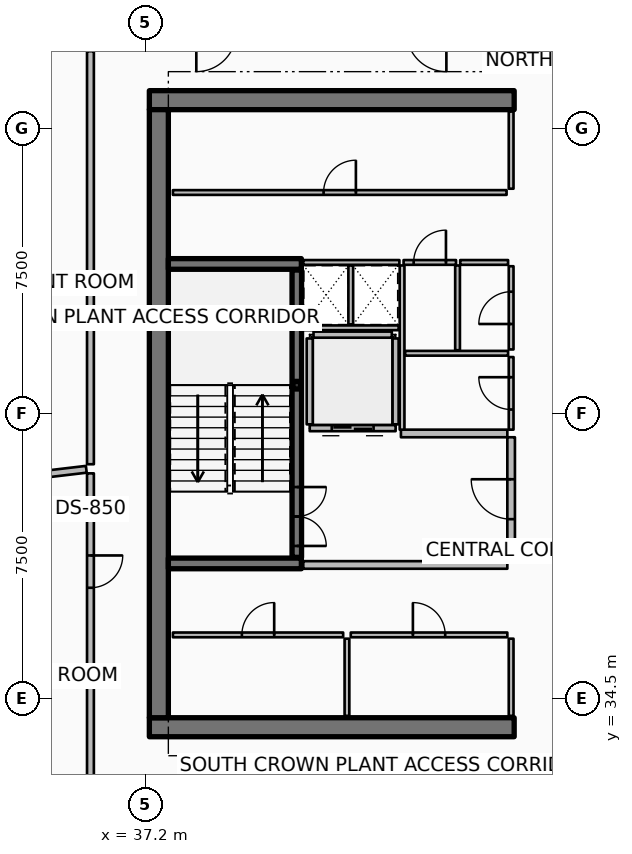
"""IFC4 building model, lengths in metres.
Left out: names, types, materials, properties, quantities, classifications, styles, units other than length and angle.
Written with IfcOpenShell. Run it as: python <this file> out.ifc"""

import sys

from ifc_helpers import new_model, si_unit, direction, frame, frame_2d, origin, origin_2d, place, context, subcontext, project, spatial, rectangle, hollow_rectangle, extrude, element, fill, save


model = new_model("IFC4")
c1 = context("Model", 3, precision=1e-05, world=origin(), true_north=direction((0.0, 1.0)))
c2 = subcontext(c1, "Body", "Model", "MODEL_VIEW")
j1 = project(units=[si_unit("LENGTHUNIT", "METRE"), si_unit("PLANEANGLEUNIT", "RADIAN")], contexts=[c1])
p1 = place(None, origin())
s1 = spatial("IfcSite", under=j1, at=p1, CompositionType="ELEMENT")
p2 = place(p1, origin())
s2 = spatial("IfcBuilding", under=s1, at=p2, CompositionType="ELEMENT")
p3 = place(p2, frame((0.0, 0.0, 370.4)))
s3 = spatial("IfcBuildingStorey", under=s2, at=p3, CompositionType="ELEMENT", Elevation=370.4)
for number, where, z_axis, x_axis in (
    (1, (37.3, 33.75, 0.0), (0.0, 0.0, 1.0), (1.0, 0.0, 0.0)),
    (2, (37.3, 50.25, 0.0), (0.0, 0.0, 1.0), (1.0, 0.0, 0.0)),
):
    element("IfcWall", number, at=place(p3, frame(where, z_axis=z_axis, x_axis=x_axis)), inside=s3, PredefinedType="SHEAR", context=c2, shape_type="SweptSolid", body=[
        extrude(rectangle(XDim=9.6, YDim=0.5, at=frame_2d((4.8, 0.0))), origin(), (0.0, 0.0, 1.0), 3.6),
    ])
p4 = place(p3, frame((37.55, 34.0, 0.0), z_axis=(0.0, 0.0, 1.0), x_axis=(0.0, 1.0, 0.0)))
e3 = element("IfcWall", 3, at=p4, inside=s3, PredefinedType="SHEAR", context=c2, shape_type="SweptSolid", body=[
    extrude(rectangle(XDim=16.0, YDim=0.5, at=frame_2d((8.0, 0.0))), origin(), (0.0, 0.0, 1.0), 3.6),
])
for number, where, z_axis, x_axis in (
    (4, (37.8, 38.06, 0.0), (0.0, 0.0, 1.0), (1.0, 0.0, 0.0)),
    (5, (37.8, 45.94, 0.0), (0.0, 0.0, 1.0), (1.0, 0.0, 0.0)),
):
    element("IfcWall", number, at=place(p3, frame(where, z_axis=z_axis, x_axis=x_axis)), inside=s3, PredefinedType="SHEAR", context=c2, shape_type="SweptSolid", body=[
        extrude(rectangle(XDim=3.5, YDim=0.28, at=frame_2d((1.75, 0.0))), origin(), (0.0, 0.0, 1.0), 3.6),
    ])
p5 = place(p3, frame((41.18, 42.75, 0.0), z_axis=(0.0, 0.0, 1.0), x_axis=(1.0, 0.0, 0.0)))
e6 = element("IfcColumn", 6, at=p5, inside=s3, PredefinedType="COLUMN", context=c2, shape_type="SweptSolid", body=[
    extrude(hollow_rectangle(XDim=0.2, YDim=0.2, WallThickness=0.01, InnerFilletRadius=0.01, OuterFilletRadius=0.02, at=origin_2d()), origin(), (0.0, 0.0, 1.0), 1.595),
])
p6 = place(p3, frame((41.18, 38.22, 0.0), z_axis=(0.0, 0.0, 1.0), x_axis=(0.0, 1.0, 0.0)))
e7 = element("IfcWall", 7, at=p6, inside=s3, PredefinedType="SOLIDWALL", context=c2, shape_type="SweptSolid", body=[
    extrude(rectangle(XDim=7.56, YDim=0.25, at=frame_2d((3.78, 0.0))), origin(), (0.0, 0.0, 1.0), 3.32),
])
p7 = place(p6, frame((0.3, 0.0, 0.0)))
e8 = element("IfcOpeningElement", 8, at=p7, cuts=e7, PredefinedType="OPENING", context=c2, shape_type="SweptSolid", body=[
    extrude(rectangle(XDim=1.55, YDim=2.15, at=frame_2d((0.775, 1.075))), frame((0.0, 0.135, 0.0), z_axis=(0.0, -1.0, 0.0), x_axis=(1.0, 0.0, 0.0)), (0.0, 0.0, 1.0), 0.27),
])
p8 = place(p3, frame((43.78, 41.62, 0.0), z_axis=(0.0, 0.0, 1.0), x_axis=(-1.0, 0.0, 0.0)))
e9 = element("IfcWall", 9, at=p8, inside=s3, PredefinedType="PARTITIONING", context=c2, shape_type="SweptSolid", body=[
    extrude(rectangle(XDim=2.26, YDim=0.16, at=frame_2d((1.13, 0.0))), origin(), (0.0, 0.0, 1.0), 3.32),
])
p9 = place(p8, frame((0.58, 0.0, 0.0)))
e10 = element("IfcOpeningElement", 10, at=p9, cuts=e9, PredefinedType="OPENING", context=c2, shape_type="SweptSolid", body=[
    extrude(rectangle(XDim=1.1, YDim=2.1, at=frame_2d((0.55, 1.05))), frame((0.0, 0.09, 0.0), z_axis=(0.0, -1.0, 0.0), x_axis=(1.0, 0.0, 0.0)), (0.0, 0.0, 1.0), 0.18),
])
for number, where, z_axis, x_axis in (
    (11, (43.78, 41.72, 0.0), (0.0, 0.0, 1.0), (0.0, 1.0, 0.0)),
    (12, (41.52, 41.72, 0.0), (0.0, 0.0, 1.0), (0.0, 1.0, 0.0)),
):
    element("IfcWall", number, at=place(p3, frame(where, z_axis=z_axis, x_axis=x_axis)), inside=s3, PredefinedType="PARTITIONING", context=c2, shape_type="SweptSolid", body=[
        extrude(rectangle(XDim=2.26, YDim=0.16, at=frame_2d((1.13, 0.0))), origin(), (0.0, 0.0, 1.0), 3.32),
    ])
p10 = place(p3, frame((41.62, 44.08, 0.0), z_axis=(0.0, 0.0, 1.0), x_axis=(1.0, 0.0, 0.0)))
e13 = element("IfcWall", 13, at=p10, inside=s3, PredefinedType="PARTITIONING", context=c2, shape_type="SweptSolid", body=[
    extrude(rectangle(XDim=2.06, YDim=0.16, at=frame_2d((1.03, 0.0))), origin(), (0.0, 0.0, 1.0), 3.32),
])
for number, where, z_axis, x_axis in (
    (14, (46.82, 34.05, 0.0), (0.0, 0.0, 1.0), (0.0, 1.0, 0.0)),
    (15, (42.5, 34.05, 0.0), (0.0, 0.0, 1.0), (0.0, 1.0, 0.0)),
):
    element("IfcWall", number, at=place(p3, frame(where, z_axis=z_axis, x_axis=x_axis)), inside=s3, PredefinedType="PARTITIONING", context=c2, shape_type="SweptSolid", body=[
        extrude(rectangle(XDim=2.03, YDim=0.125, at=frame_2d((1.015, 0.0))), origin(), (0.0, 0.0, 1.0), 2.76),
    ])
p11 = place(p3, frame((37.92, 36.18, 0.0), z_axis=(0.0, 0.0, 1.0), x_axis=(1.0, 0.0, 0.0)))
e16 = element("IfcWall", 16, at=p11, inside=s3, PredefinedType="PARTITIONING", context=c2, shape_type="SweptSolid", body=[
    extrude(rectangle(XDim=4.48, YDim=0.125, at=frame_2d((2.24, 0.0))), origin(), (0.0, 0.0, 1.0), 2.76),
])
p12 = place(p11, frame((1.815, 0.0, 0.0)))
e17 = element("IfcOpeningElement", 17, at=p12, cuts=e16, PredefinedType="OPENING", context=c2, shape_type="SweptSolid", body=[
    extrude(rectangle(XDim=0.85, YDim=2.06, at=frame_2d((0.425, 1.03))), frame((0.0, 0.073, 0.0), z_axis=(0.0, -1.0, 0.0), x_axis=(1.0, 0.0, 0.0)), (0.0, 0.0, 1.0), 0.145),
])
p13 = place(p3, frame((42.6, 36.18, 0.0), z_axis=(0.0, 0.0, 1.0), x_axis=(1.0, 0.0, 0.0)))
e18 = element("IfcWall", 18, at=p13, inside=s3, PredefinedType="PARTITIONING", context=c2, shape_type="SweptSolid", body=[
    extrude(rectangle(XDim=4.12, YDim=0.125, at=frame_2d((2.06, 0.0))), origin(), (0.0, 0.0, 1.0), 2.76),
])
p14 = place(p13, frame((1.635, 0.0, 0.0)))
e19 = element("IfcOpeningElement", 19, at=p14, cuts=e18, PredefinedType="OPENING", context=c2, shape_type="SweptSolid", body=[
    extrude(rectangle(XDim=0.85, YDim=2.06, at=frame_2d((0.425, 1.03))), frame((0.0, 0.073, 0.0), z_axis=(0.0, -1.0, 0.0), x_axis=(1.0, 0.0, 0.0)), (0.0, 0.0, 1.0), 0.145),
])
p15 = place(p3, frame((46.82, 47.92, 0.0), z_axis=(0.0, 0.0, 1.0), x_axis=(0.0, 1.0, 0.0)))
e20 = element("IfcWall", 20, at=p15, inside=s3, PredefinedType="PARTITIONING", context=c2, shape_type="SweptSolid", body=[
    extrude(rectangle(XDim=2.03, YDim=0.125, at=frame_2d((1.015, 0.0))), origin(), (0.0, 0.0, 1.0), 2.76),
])
p16 = place(p3, frame((37.92, 47.82, 0.0), z_axis=(0.0, 0.0, 1.0), x_axis=(1.0, 0.0, 0.0)))
e21 = element("IfcWall", 21, at=p16, inside=s3, PredefinedType="PARTITIONING", context=c2, shape_type="SweptSolid", body=[
    extrude(rectangle(XDim=8.78, YDim=0.125, at=frame_2d((4.39, 0.0))), origin(), (0.0, 0.0, 1.0), 2.76),
])
p17 = place(p16, frame((3.965, 0.0, 0.0)))
e22 = element("IfcOpeningElement", 22, at=p17, cuts=e21, PredefinedType="OPENING", context=c2, shape_type="SweptSolid", body=[
    extrude(rectangle(XDim=0.85, YDim=2.06, at=frame_2d((0.425, 1.03))), frame((0.0, 0.073, 0.0), z_axis=(0.0, -1.0, 0.0), x_axis=(1.0, 0.0, 0.0)), (0.0, 0.0, 1.0), 0.145),
])
p18 = place(p3, frame((41.35, 38.02, 0.0), z_axis=(0.0, 0.0, 1.0), x_axis=(1.0, 0.0, 0.0)))
e23 = element("IfcWall", 23, at=p18, inside=s3, PredefinedType="PARTITIONING", context=c2, shape_type="SweptSolid", body=[
    extrude(rectangle(XDim=5.37, YDim=0.2, at=frame_2d((2.685, 0.0))), origin(), (0.0, 0.0, 1.0), 3.32),
])
p19 = place(p3, frame((43.92, 41.48, 0.0), z_axis=(0.0, 0.0, 1.0), x_axis=(1.0, 0.0, 0.0)))
e24 = element("IfcWall", 24, at=p19, inside=s3, PredefinedType="PARTITIONING", context=c2, shape_type="SweptSolid", body=[
    extrude(rectangle(XDim=2.8, YDim=0.2, at=frame_2d((1.4, 0.0))), origin(), (0.0, 0.0, 1.0), 3.32),
])
p20 = place(p3, frame((46.82, 38.12, 0.0), z_axis=(0.0, 0.0, 1.0), x_axis=(0.0, 1.0, 0.0)))
e25 = element("IfcWall", 25, at=p20, inside=s3, PredefinedType="PARTITIONING", context=c2, shape_type="SweptSolid", body=[
    extrude(rectangle(XDim=3.26, YDim=0.2, at=frame_2d((1.63, 0.0))), origin(), (0.0, 0.0, 1.0), 3.32),
])
p21 = place(p20, frame((1.105, 0.0, 0.0)))
e26 = element("IfcOpeningElement", 26, at=p21, cuts=e25, PredefinedType="OPENING", context=c2, shape_type="SweptSolid", body=[
    extrude(rectangle(XDim=1.05, YDim=2.1, at=frame_2d((0.525, 1.05))), frame((0.0, 0.11, 0.0), z_axis=(0.0, -1.0, 0.0), x_axis=(1.0, 0.0, 0.0)), (0.0, 0.0, 1.0), 0.22),
])
p22 = place(p3, frame((41.36, 44.26, 0.0), z_axis=(0.0, 0.0, 1.0), x_axis=(1.0, 0.0, 0.0)))
e27 = element("IfcWall", 27, at=p22, inside=s3, PredefinedType="PARTITIONING", context=c2, shape_type="SweptSolid", body=[
    extrude(rectangle(XDim=2.5, YDim=0.125, at=frame_2d((1.25, 0.0))), origin(), (0.0, 0.0, 1.0), 2.76),
])
p23 = place(p3, frame((42.6, 44.35, 0.0), z_axis=(0.0, 0.0, 1.0), x_axis=(0.0, 1.0, 0.0)))
e28 = element("IfcWall", 28, at=p23, inside=s3, PredefinedType="PARTITIONING", context=c2, shape_type="SweptSolid", body=[
    extrude(rectangle(XDim=1.55, YDim=0.125, at=frame_2d((0.775, 0.0))), origin(), (0.0, 0.0, 1.0), 2.76),
])
p24 = place(p3, frame((43.95, 41.58, 0.0), z_axis=(0.0, 0.0, 1.0), x_axis=(0.0, 1.0, 0.0)))
e29 = element("IfcWall", 29, at=p24, inside=s3, PredefinedType="PARTITIONING", context=c2, shape_type="SweptSolid", body=[
    extrude(rectangle(XDim=4.32, YDim=0.125, at=frame_2d((2.16, 0.0))), origin(), (0.0, 0.0, 1.0), 2.76),
])
p25 = place(p3, frame((44.03, 43.59, 0.0), z_axis=(0.0, 0.0, 1.0), x_axis=(1.0, 0.0, 0.0)))
e30 = element("IfcWall", 30, at=p25, inside=s3, PredefinedType="PARTITIONING", context=c2, shape_type="SweptSolid", body=[
    extrude(rectangle(XDim=2.71, YDim=0.125, at=frame_2d((1.355, 0.0))), origin(), (0.0, 0.0, 1.0), 2.76),
])
p26 = place(p3, frame((45.41, 43.67, 0.0), z_axis=(0.0, 0.0, 1.0), x_axis=(0.0, 1.0, 0.0)))
e31 = element("IfcWall", 31, at=p26, inside=s3, PredefinedType="PARTITIONING", context=c2, shape_type="SweptSolid", body=[
    extrude(rectangle(XDim=2.23, YDim=0.125, at=frame_2d((1.115, 0.0))), origin(), (0.0, 0.0, 1.0), 2.76),
])
p27 = place(p3, frame((46.82, 41.58, 0.0), z_axis=(0.0, 0.0, 1.0), x_axis=(0.0, 1.0, 0.0)))
e32 = element("IfcWall", 32, at=p27, inside=s3, PredefinedType="PARTITIONING", context=c2, shape_type="SweptSolid", body=[
    extrude(rectangle(XDim=1.91, YDim=0.125, at=frame_2d((0.955, 0.0))), origin(), (0.0, 0.0, 1.0), 2.76),
])
p28 = place(p27, frame((0.53, 0.0, 0.0)))
e33 = element("IfcOpeningElement", 33, at=p28, cuts=e32, PredefinedType="OPENING", context=c2, shape_type="SweptSolid", body=[
    extrude(rectangle(XDim=0.85, YDim=2.06, at=frame_2d((0.425, 1.03))), frame((0.0, 0.073, 0.0), z_axis=(0.0, -1.0, 0.0), x_axis=(1.0, 0.0, 0.0)), (0.0, 0.0, 1.0), 0.145),
])
p29 = place(p3, frame((46.82, 43.69, 0.0), z_axis=(0.0, 0.0, 1.0), x_axis=(0.0, 1.0, 0.0)))
e34 = element("IfcWall", 34, at=p29, inside=s3, PredefinedType="PARTITIONING", context=c2, shape_type="SweptSolid", body=[
    extrude(rectangle(XDim=2.19, YDim=0.125, at=frame_2d((1.095, 0.0))), origin(), (0.0, 0.0, 1.0), 2.76),
])
p30 = place(p29, frame((0.67, 0.0, 0.0)))
e35 = element("IfcOpeningElement", 35, at=p30, cuts=e34, PredefinedType="OPENING", context=c2, shape_type="SweptSolid", body=[
    extrude(rectangle(XDim=0.85, YDim=2.06, at=frame_2d((0.425, 1.03))), frame((0.0, 0.073, 0.0), z_axis=(0.0, -1.0, 0.0), x_axis=(1.0, 0.0, 0.0)), (0.0, 0.0, 1.0), 0.145),
])
p31 = place(p3, frame((41.35, 45.98, 0.0), z_axis=(0.0, 0.0, 1.0), x_axis=(1.0, 0.0, 0.0)))
e36 = element("IfcWall", 36, at=p31, inside=s3, PredefinedType="PARTITIONING", context=c2, shape_type="SweptSolid", body=[
    extrude(rectangle(XDim=2.53, YDim=0.125, at=frame_2d((1.265, 0.0))), origin(), (0.0, 0.0, 1.0), 2.76),
])
p32 = place(p3, frame((43.99, 45.98, 0.0), z_axis=(0.0, 0.0, 1.0), x_axis=(1.0, 0.0, 0.0)))
e37 = element("IfcWall", 37, at=p32, inside=s3, PredefinedType="PARTITIONING", context=c2, shape_type="SweptSolid", body=[
    extrude(rectangle(XDim=1.38, YDim=0.125, at=frame_2d((0.69, 0.0))), origin(), (0.0, 0.0, 1.0), 2.76),
])
p33 = place(p32, frame((0.265, 0.0, 0.0)))
e38 = element("IfcOpeningElement", 38, at=p33, cuts=e37, PredefinedType="OPENING", context=c2, shape_type="SweptSolid", body=[
    extrude(rectangle(XDim=0.85, YDim=2.06, at=frame_2d((0.425, 1.03))), frame((0.0, 0.073, 0.0), z_axis=(0.0, -1.0, 0.0), x_axis=(1.0, 0.0, 0.0)), (0.0, 0.0, 1.0), 0.145),
])
p34 = place(p3, frame((45.48, 45.98, 0.0), z_axis=(0.0, 0.0, 1.0), x_axis=(1.0, 0.0, 0.0)))
e39 = element("IfcWall", 39, at=p34, inside=s3, PredefinedType="PARTITIONING", context=c2, shape_type="SweptSolid", body=[
    extrude(rectangle(XDim=1.26, YDim=0.125, at=frame_2d((0.63, 0.0))), origin(), (0.0, 0.0, 1.0), 2.76),
])
p35 = place(p3, frame((35.75, 51.537, 0.0), z_axis=(0.0, 0.0, 1.0), x_axis=(0.0, -1.0, 0.0)))
e40 = element("IfcWall", 40, at=p35, inside=s3, PredefinedType="PARTITIONING", context=c2, shape_type="SweptSolid", body=[
    extrude(rectangle(XDim=5.962, YDim=0.18, at=frame_2d((2.981, 0.0))), origin(), (0.0, 0.0, 1.0), 2.76),
])
p36 = place(p3, frame((35.75, 45.335, 0.0), z_axis=(0.0, 0.0, 1.0), x_axis=(0.0, -1.0, 0.0)))
e41 = element("IfcWall", 41, at=p36, inside=s3, PredefinedType="PARTITIONING", context=c2, shape_type="SweptSolid", body=[
    extrude(rectangle(XDim=4.665, YDim=0.18, at=frame_2d((2.333, 0.0))), origin(), (0.0, 0.0, 1.0), 2.76),
])
p37 = place(p3, frame((35.641, 40.537, 0.0), z_axis=(0.0, 0.0, 1.0), x_axis=(-0.993070751419, -0.117518010011, 0.0)))
e42 = element("IfcWall", 42, at=p37, inside=s3, PredefinedType="PARTITIONING", context=c2, shape_type="SweptSolid", body=[
    extrude(rectangle(XDim=8.686, YDim=0.18, at=frame_2d((4.343, 0.0))), origin(), (0.0, 0.0, 1.0), 2.76),
])
p38 = place(p3, frame((35.75, 40.43, 0.0), z_axis=(0.0, 0.0, 1.0), x_axis=(0.0, -1.0, 0.0)))
e43 = element("IfcWall", 43, at=p38, inside=s3, PredefinedType="PARTITIONING", context=c2, shape_type="SweptSolid", body=[
    extrude(rectangle(XDim=5.17, YDim=0.18, at=frame_2d((2.585, 0.0))), origin(), (0.0, 0.0, 1.0), 2.76),
])
p39 = place(p38, frame((2.16, 0.0, 0.0)))
e44 = element("IfcOpeningElement", 44, at=p39, cuts=e43, PredefinedType="OPENING", context=c2, shape_type="SweptSolid", body=[
    extrude(rectangle(XDim=0.85, YDim=2.06, at=frame_2d((0.425, 1.03))), frame((0.0, 0.1, 0.0), z_axis=(0.0, -1.0, 0.0), x_axis=(1.0, 0.0, 0.0)), (0.0, 0.0, 1.0), 0.2),
])
p40 = place(p3, frame((35.75, 35.02, 0.0), z_axis=(0.0, 0.0, 1.0), x_axis=(0.0, -1.0, 0.0)))
e45 = element("IfcWall", 45, at=p40, inside=s3, PredefinedType="PARTITIONING", context=c2, shape_type="SweptSolid", body=[
    extrude(rectangle(XDim=2.95, YDim=0.18, at=frame_2d((1.475, 0.0))), origin(), (0.0, 0.0, 1.0), 2.76),
])
p41 = place(p7, origin())
e46 = element("IfcDoor", 46, at=p41, inside=s3, OperationType="DOUBLE_DOOR_SINGLE_SWING", PredefinedType="DOOR", context=c2, shape_type="SweptSolid", body=[
    extrude(rectangle(XDim=1.55, YDim=2.15, at=frame_2d((0.775, 1.075))), frame((0.0, 0.025, 0.0), z_axis=(0.0, -1.0, 0.0), x_axis=(1.0, 0.0, 0.0)), (0.0, 0.0, 1.0), 0.05),
])
fill(e8, e46)
p42 = place(p9, origin())
e47 = element("IfcDoor", 47, at=p42, inside=s3, OperationType="DOUBLE_DOOR_SLIDING", PredefinedType="DOOR", context=c2, shape_type="SweptSolid", body=[
    extrude(rectangle(XDim=1.1, YDim=2.1, at=frame_2d((0.55, 1.05))), frame((0.0, 0.025, 0.0), z_axis=(0.0, -1.0, 0.0), x_axis=(1.0, 0.0, 0.0)), (0.0, 0.0, 1.0), 0.05),
])
fill(e10, e47)
p43 = place(p12, origin())
e48 = element("IfcDoor", 48, at=p43, inside=s3, OperationType="SINGLE_SWING_RIGHT", PredefinedType="DOOR", context=c2, shape_type="SweptSolid", body=[
    extrude(rectangle(XDim=0.85, YDim=2.06, at=frame_2d((0.425, 1.03))), frame((0.0, 0.025, 0.0), z_axis=(0.0, -1.0, 0.0), x_axis=(1.0, 0.0, 0.0)), (0.0, 0.0, 1.0), 0.05),
])
fill(e17, e48)
p44 = place(p14, origin())
e49 = element("IfcDoor", 49, at=p44, inside=s3, OperationType="SINGLE_SWING_LEFT", PredefinedType="DOOR", context=c2, shape_type="SweptSolid", body=[
    extrude(rectangle(XDim=0.85, YDim=2.06, at=frame_2d((0.425, 1.03))), frame((0.0, 0.025, 0.0), z_axis=(0.0, -1.0, 0.0), x_axis=(1.0, 0.0, 0.0)), (0.0, 0.0, 1.0), 0.05),
])
fill(e19, e49)
p45 = place(p17, origin())
e50 = element("IfcDoor", 50, at=p45, inside=s3, OperationType="SINGLE_SWING_RIGHT", PredefinedType="DOOR", context=c2, shape_type="SweptSolid", body=[
    extrude(rectangle(XDim=0.85, YDim=2.06, at=frame_2d((0.425, 1.03))), frame((0.0, 0.025, 0.0), z_axis=(0.0, -1.0, 0.0), x_axis=(1.0, 0.0, 0.0)), (0.0, 0.0, 1.0), 0.05),
])
fill(e22, e50)
p46 = place(p21, origin())
e51 = element("IfcDoor", 51, at=p46, inside=s3, OperationType="SINGLE_SWING_RIGHT", PredefinedType="DOOR", context=c2, shape_type="SweptSolid", body=[
    extrude(rectangle(XDim=1.05, YDim=2.1, at=frame_2d((0.525, 1.05))), frame((0.0, 0.025, 0.0), z_axis=(0.0, -1.0, 0.0), x_axis=(1.0, 0.0, 0.0)), (0.0, 0.0, 1.0), 0.05),
])
fill(e26, e51)
p47 = place(p28, origin())
e52 = element("IfcDoor", 52, at=p47, inside=s3, OperationType="SINGLE_SWING_RIGHT", PredefinedType="DOOR", context=c2, shape_type="SweptSolid", body=[
    extrude(rectangle(XDim=0.85, YDim=2.06, at=frame_2d((0.425, 1.03))), frame((0.0, 0.025, 0.0), z_axis=(0.0, -1.0, 0.0), x_axis=(1.0, 0.0, 0.0)), (0.0, 0.0, 1.0), 0.05),
])
fill(e33, e52)
p48 = place(p30, origin())
e53 = element("IfcDoor", 53, at=p48, inside=s3, OperationType="SINGLE_SWING_LEFT", PredefinedType="DOOR", context=c2, shape_type="SweptSolid", body=[
    extrude(rectangle(XDim=0.85, YDim=2.06, at=frame_2d((0.425, 1.03))), frame((0.0, 0.025, 0.0), z_axis=(0.0, -1.0, 0.0), x_axis=(1.0, 0.0, 0.0)), (0.0, 0.0, 1.0), 0.05),
])
fill(e35, e53)
p49 = place(p33, origin())
e54 = element("IfcDoor", 54, at=p49, inside=s3, OperationType="SINGLE_SWING_RIGHT", PredefinedType="DOOR", context=c2, shape_type="SweptSolid", body=[
    extrude(rectangle(XDim=0.85, YDim=2.06, at=frame_2d((0.425, 1.03))), frame((0.0, 0.025, 0.0), z_axis=(0.0, -1.0, 0.0), x_axis=(1.0, 0.0, 0.0)), (0.0, 0.0, 1.0), 0.05),
])
fill(e38, e54)
p50 = place(p39, origin())
e55 = element("IfcDoor", 55, at=p50, inside=s3, OperationType="SINGLE_SWING_LEFT", PredefinedType="DOOR", context=c2, shape_type="SweptSolid", body=[
    extrude(rectangle(XDim=0.85, YDim=2.06, at=frame_2d((0.425, 1.03))), frame((0.0, 0.025, 0.0), z_axis=(0.0, -1.0, 0.0), x_axis=(1.0, 0.0, 0.0)), (0.0, 0.0, 1.0), 0.05),
])
fill(e44, e55)
save(model, sys.argv[1])
